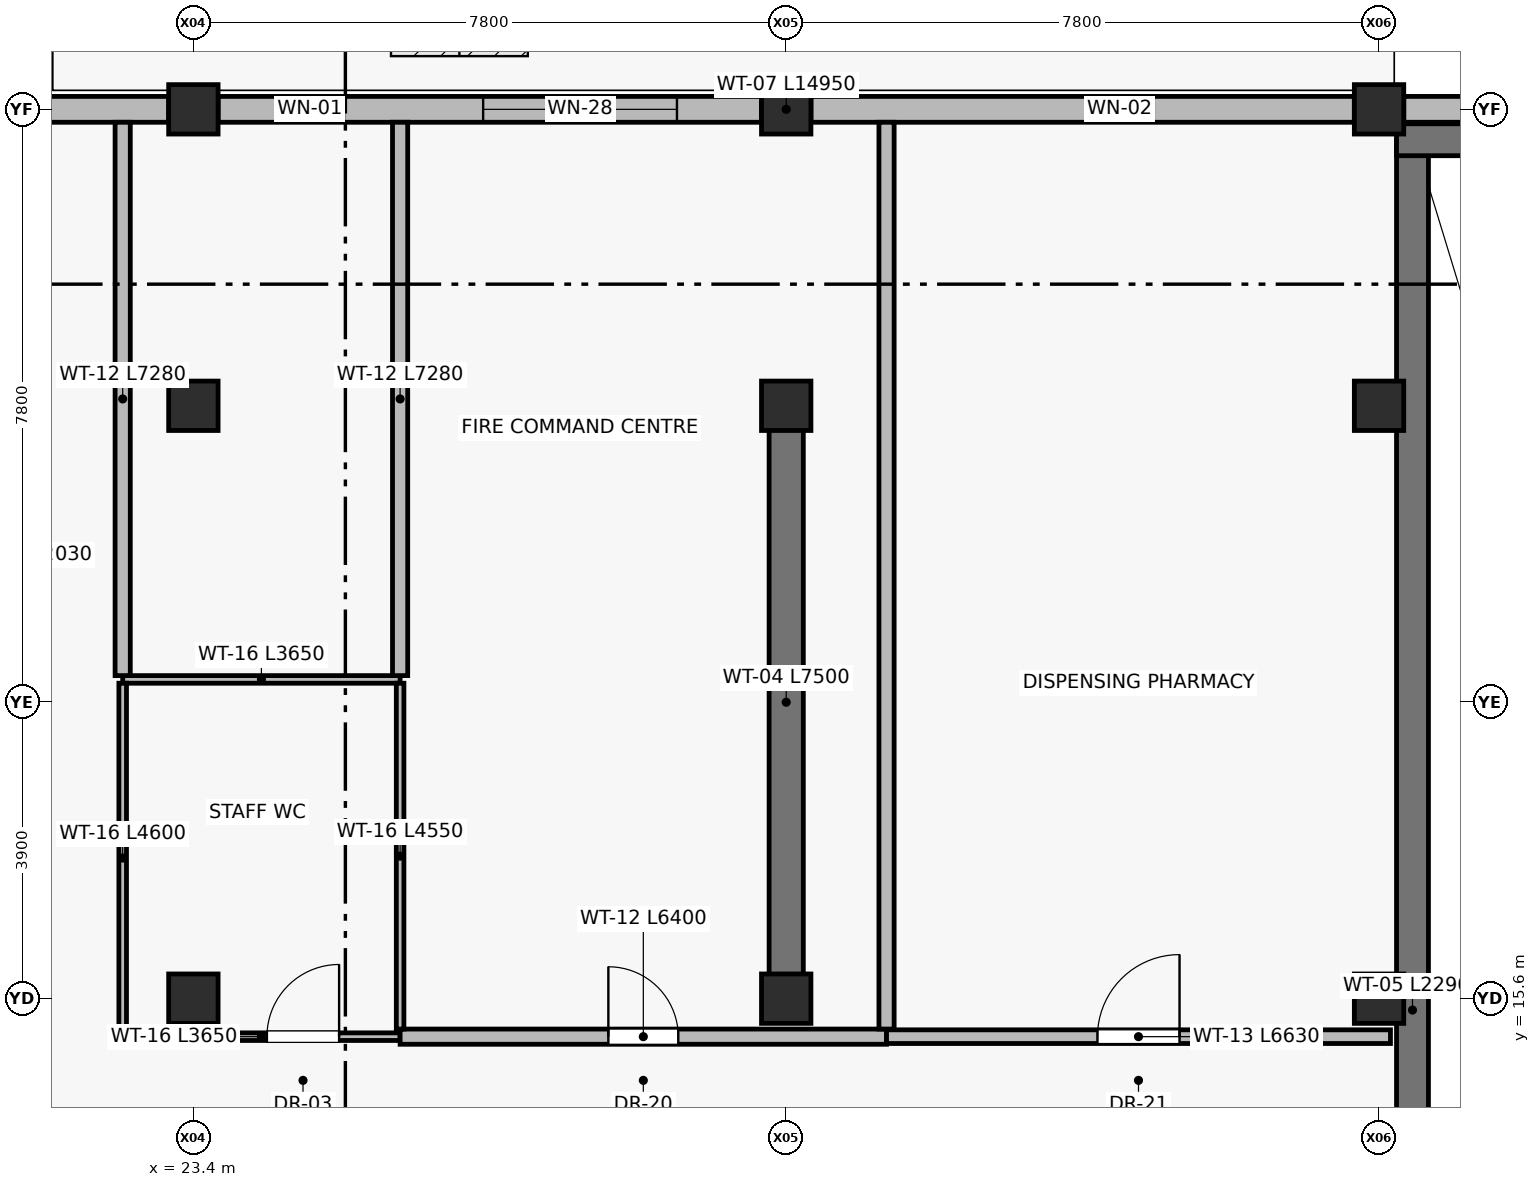
"""IFC4 building model, lengths in metres.
Left out: names, types, materials, properties, quantities, classifications, styles, units other than length and angle.
Written with IfcOpenShell. Run it as: python <this file> out.ifc"""

import sys

from ifc_helpers import new_model, si_unit, direction, frame, frame_2d, origin, origin_2d, place, context, subcontext, project, spatial, rectangle, extrude, element, fill, save


model = new_model("IFC4")
c1 = context("Model", 3, precision=1e-05, world=origin(), true_north=direction((0.0, 1.0)))
c2 = subcontext(c1, "Body", "Model", "MODEL_VIEW")
j1 = project(units=[si_unit("LENGTHUNIT", "METRE"), si_unit("PLANEANGLEUNIT", "RADIAN")], contexts=[c1])
p1 = place(None, origin())
s1 = spatial("IfcSite", under=j1, at=p1, CompositionType="ELEMENT")
p2 = place(p1, origin())
s2 = spatial("IfcBuilding", under=s1, at=p2, CompositionType="ELEMENT")
p3 = place(p2, origin())
s3 = spatial("IfcBuildingStorey", under=s2, at=p3, CompositionType="ELEMENT", Elevation=0.0)
for number, where, z_axis, x_axis in (
    (1, (23.4, 15.6, 0.0), (0.0, 0.0, 1.0), (1.0, 0.0, 0.0)),
    (2, (23.4, 23.4, 0.0), (0.0, 0.0, 1.0), (1.0, 0.0, 0.0)),
    (3, (23.4, 27.3, 0.0), (0.0, 0.0, 1.0), (1.0, 0.0, 0.0)),
    (4, (31.2, 15.6, 0.0), (0.0, 0.0, 1.0), (1.0, 0.0, 0.0)),
    (5, (31.2, 23.4, 0.0), (0.0, 0.0, 1.0), (1.0, 0.0, 0.0)),
    (6, (31.2, 27.3, 0.0), (0.0, 0.0, 1.0), (1.0, 0.0, 0.0)),
    (7, (39.0, 15.6, 0.0), (0.0, 0.0, 1.0), (1.0, 0.0, 0.0)),
    (8, (39.0, 23.4, 0.0), (0.0, 0.0, 1.0), (1.0, 0.0, 0.0)),
    (9, (39.0, 27.3, 0.0), (0.0, 0.0, 1.0), (1.0, 0.0, 0.0)),
):
    element("IfcColumn", number, at=place(p3, frame(where, z_axis=z_axis, x_axis=x_axis)), inside=s3, PredefinedType="COLUMN", context=c2, shape_type="SweptSolid", body=[
        extrude(rectangle(XDim=0.65, YDim=0.65, at=origin_2d()), origin(), (0.0, 0.0, 1.0), 4.8),
    ])
p4 = place(p3, frame((21.3, 27.3, 0.0), z_axis=(0.0, 0.0, 1.0), x_axis=(1.0, 0.0, 0.0)))
e10 = element("IfcWall", 10, at=p4, inside=s3, PredefinedType="STANDARD", context=c2, shape_type="SweptSolid", body=[
    extrude(rectangle(XDim=1.775, YDim=0.34, at=frame_2d((0.887, 0.0))), origin(), (0.0, 0.0, 1.0), 4.14),
])
p5 = place(p3, frame((23.725, 27.3, 0.0), z_axis=(0.0, 0.0, 1.0), x_axis=(1.0, 0.0, 0.0)))
e11 = element("IfcWall", 11, at=p5, inside=s3, PredefinedType="STANDARD", context=c2, shape_type="SweptSolid", body=[
    extrude(rectangle(XDim=7.15, YDim=0.34, at=frame_2d((3.575, 0.0))), origin(), (0.0, 0.0, 1.0), 4.14),
])
p6 = place(p5, frame((0.758, 0.0, 0.9)))
e12 = element("IfcOpeningElement", 12, at=p6, cuts=e11, PredefinedType="OPENING", context=c2, shape_type="SweptSolid", body=[
    extrude(rectangle(XDim=0.9, YDim=1.6, at=frame_2d((0.45, 0.8))), frame((0.0, 0.18, 0.0), z_axis=(0.0, -1.0, 0.0), x_axis=(1.0, 0.0, 0.0)), (0.0, 0.0, 1.0), 0.36),
])
p7 = place(p5, frame((3.488, 0.0, 0.9)))
e13 = element("IfcOpeningElement", 13, at=p7, cuts=e11, PredefinedType="OPENING", context=c2, shape_type="SweptSolid", body=[
    extrude(rectangle(XDim=2.55, YDim=1.8, at=frame_2d((1.275, 0.9))), frame((0.0, 0.18, 0.0), z_axis=(0.0, -1.0, 0.0), x_axis=(1.0, 0.0, 0.0)), (0.0, 0.0, 1.0), 0.36),
])
p8 = place(p3, frame((31.525, 27.3, 0.0), z_axis=(0.0, 0.0, 1.0), x_axis=(1.0, 0.0, 0.0)))
e14 = element("IfcWall", 14, at=p8, inside=s3, PredefinedType="STANDARD", context=c2, shape_type="SweptSolid", body=[
    extrude(rectangle(XDim=7.15, YDim=0.34, at=frame_2d((3.575, 0.0))), origin(), (0.0, 0.0, 1.0), 4.14),
])
p9 = place(p8, frame((3.613, 0.0, 0.9)))
e15 = element("IfcOpeningElement", 15, at=p9, cuts=e14, PredefinedType="OPENING", context=c2, shape_type="SweptSolid", body=[
    extrude(rectangle(XDim=0.9, YDim=2.0, at=frame_2d((0.45, 1.0))), frame((0.0, 0.18, 0.0), z_axis=(0.0, -1.0, 0.0), x_axis=(1.0, 0.0, 0.0)), (0.0, 0.0, 1.0), 0.36),
])
p10 = place(p3, frame((39.325, 27.3, 0.0), z_axis=(0.0, 0.0, 1.0), x_axis=(1.0, 0.0, 0.0)))
e16 = element("IfcWall", 16, at=p10, inside=s3, PredefinedType="STANDARD", context=c2, shape_type="SweptSolid", body=[
    extrude(rectangle(XDim=7.15, YDim=0.34, at=frame_2d((3.575, 0.0))), origin(), (0.0, 0.0, 1.0), 4.14),
])
p11 = place(p3, frame((39.44, 4.0, 0.0), z_axis=(0.0, 0.0, 1.0), x_axis=(0.0, 1.0, 0.0)))
e17 = element("IfcWall", 17, at=p11, inside=s3, PredefinedType="SOLIDWALL", context=c2, shape_type="SweptSolid", body=[
    extrude(rectangle(XDim=22.9, YDim=0.42, at=frame_2d((11.45, 0.0))), origin(), (0.0, 0.0, 1.0), 4.54),
])
p12 = place(p3, frame((39.23, 26.9, 0.0), z_axis=(0.0, 0.0, 1.0), x_axis=(1.0, 0.0, 0.0)))
e18 = element("IfcWall", 18, at=p12, inside=s3, PredefinedType="SOLIDWALL", context=c2, shape_type="SweptSolid", body=[
    extrude(rectangle(XDim=7.34, YDim=0.42, at=frame_2d((3.67, 0.0))), origin(), (0.0, 0.0, 1.0), 4.54),
])
p13 = place(p3, frame((31.2, 15.75, 0.0), z_axis=(0.0, 0.0, 1.0), x_axis=(0.0, 1.0, 0.0)))
e19 = element("IfcWall", 19, at=p13, inside=s3, PredefinedType="SHEAR", context=c2, shape_type="SweptSolid", body=[
    extrude(rectangle(XDim=7.5, YDim=0.45, at=frame_2d((3.75, 0.0))), origin(), (0.0, 0.0, 1.0), 4.54),
])
p14 = place(p3, frame((22.47, 15.1, 0.0), z_axis=(0.0, 0.0, 1.0), x_axis=(1.0, 0.0, 0.0)))
e20 = element("IfcWall", 20, at=p14, inside=s3, PredefinedType="PARTITIONING", context=c2, shape_type="SweptSolid", body=[
    extrude(rectangle(XDim=3.65, YDim=0.1, at=frame_2d((1.825, 0.0))), origin(), (0.0, 0.0, 1.0), 4.54),
])
p15 = place(p14, frame((1.897, 0.0, 0.0)))
e21 = element("IfcOpeningElement", 21, at=p15, cuts=e20, PredefinedType="OPENING", context=c2, shape_type="SweptSolid", body=[
    extrude(rectangle(XDim=0.95, YDim=2.1, at=frame_2d((0.475, 1.05))), frame((0.0, 0.06, 0.0), z_axis=(0.0, -1.0, 0.0), x_axis=(1.0, 0.0, 0.0)), (0.0, 0.0, 1.0), 0.12),
])
p16 = place(p3, frame((22.47, 19.8, 0.0), z_axis=(0.0, 0.0, 1.0), x_axis=(1.0, 0.0, 0.0)))
e22 = element("IfcWall", 22, at=p16, inside=s3, PredefinedType="PARTITIONING", context=c2, shape_type="SweptSolid", body=[
    extrude(rectangle(XDim=3.65, YDim=0.1, at=frame_2d((1.825, 0.0))), origin(), (0.0, 0.0, 1.0), 4.54),
])
p17 = place(p3, frame((26.12, 15.1, 0.0), z_axis=(0.0, 0.0, 1.0), x_axis=(1.0, 0.0, 0.0)))
e23 = element("IfcWall", 23, at=p17, inside=s3, PredefinedType="SOLIDWALL", context=c2, shape_type="SweptSolid", body=[
    extrude(rectangle(XDim=6.4, YDim=0.2, at=frame_2d((3.2, 0.0))), origin(), (0.0, 0.0, 1.0), 4.54),
])
p18 = place(p17, frame((2.74, 0.0, 0.0)))
e24 = element("IfcOpeningElement", 24, at=p18, cuts=e23, PredefinedType="OPENING", context=c2, shape_type="SweptSolid", body=[
    extrude(rectangle(XDim=0.92, YDim=2.15, at=frame_2d((0.46, 1.075))), frame((0.0, 0.11, 0.0), z_axis=(0.0, -1.0, 0.0), x_axis=(1.0, 0.0, 0.0)), (0.0, 0.0, 1.0), 0.22),
])
p19 = place(p3, frame((32.52, 15.1, 0.0), z_axis=(0.0, 0.0, 1.0), x_axis=(1.0, 0.0, 0.0)))
e25 = element("IfcWall", 25, at=p19, inside=s3, PredefinedType="PARTITIONING", context=c2, shape_type="SweptSolid", body=[
    extrude(rectangle(XDim=6.63, YDim=0.18, at=frame_2d((3.315, 0.0))), origin(), (0.0, 0.0, 1.0), 4.54),
])
p20 = place(p19, frame((2.775, 0.0, 0.0)))
e26 = element("IfcOpeningElement", 26, at=p20, cuts=e25, PredefinedType="OPENING", context=c2, shape_type="SweptSolid", body=[
    extrude(rectangle(XDim=1.08, YDim=2.2, at=frame_2d((0.54, 1.1))), frame((0.0, 0.1, 0.0), z_axis=(0.0, -1.0, 0.0), x_axis=(1.0, 0.0, 0.0)), (0.0, 0.0, 1.0), 0.2),
])
p21 = place(p3, frame((22.47, 15.15, 0.0), z_axis=(0.0, 0.0, 1.0), x_axis=(0.0, 1.0, 0.0)))
e27 = element("IfcWall", 27, at=p21, inside=s3, PredefinedType="PARTITIONING", context=c2, shape_type="SweptSolid", body=[
    extrude(rectangle(XDim=4.6, YDim=0.1, at=frame_2d((2.3, 0.0))), origin(), (0.0, 0.0, 1.0), 4.54),
])
p22 = place(p3, frame((26.12, 15.2, 0.0), z_axis=(0.0, 0.0, 1.0), x_axis=(0.0, 1.0, 0.0)))
e28 = element("IfcWall", 28, at=p22, inside=s3, PredefinedType="PARTITIONING", context=c2, shape_type="SweptSolid", body=[
    extrude(rectangle(XDim=4.55, YDim=0.1, at=frame_2d((2.275, 0.0))), origin(), (0.0, 0.0, 1.0), 4.21),
])
p23 = place(p3, frame((26.12, 19.85, 0.0), z_axis=(0.0, 0.0, 1.0), x_axis=(0.0, 1.0, 0.0)))
e29 = element("IfcWall", 29, at=p23, inside=s3, PredefinedType="SOLIDWALL", context=c2, shape_type="SweptSolid", body=[
    extrude(rectangle(XDim=7.28, YDim=0.2, at=frame_2d((3.64, 0.0))), origin(), (0.0, 0.0, 1.0), 4.21),
])
p24 = place(p3, frame((32.52, 15.2, 0.0), z_axis=(0.0, 0.0, 1.0), x_axis=(0.0, 1.0, 0.0)))
e30 = element("IfcWall", 30, at=p24, inside=s3, PredefinedType="SOLIDWALL", context=c2, shape_type="SweptSolid", body=[
    extrude(rectangle(XDim=11.93, YDim=0.2, at=frame_2d((5.965, 0.0))), origin(), (0.0, 0.0, 1.0), 4.54),
])
p25 = place(p3, frame((22.47, 19.85, 0.0), z_axis=(0.0, 0.0, 1.0), x_axis=(0.0, 1.0, 0.0)))
e31 = element("IfcWall", 31, at=p25, inside=s3, PredefinedType="SOLIDWALL", context=c2, shape_type="SweptSolid", body=[
    extrude(rectangle(XDim=7.28, YDim=0.2, at=frame_2d((3.64, 0.0))), origin(), (0.0, 0.0, 1.0), 4.54),
])
p26 = place(p6, origin())
e32 = element("IfcWindow", 32, at=p26, inside=s3, PartitioningType="SINGLE_PANEL", PredefinedType="WINDOW", context=c2, shape_type="SweptSolid", body=[
    extrude(rectangle(XDim=0.9, YDim=1.6, at=frame_2d((0.45, 0.8))), frame((0.0, 0.03, 0.0), z_axis=(0.0, -1.0, 0.0), x_axis=(1.0, 0.0, 0.0)), (0.0, 0.0, 1.0), 0.06),
])
fill(e12, e32)
p27 = place(p7, origin())
e33 = element("IfcWindow", 33, at=p27, inside=s3, PartitioningType="SINGLE_PANEL", PredefinedType="WINDOW", context=c2, shape_type="SweptSolid", body=[
    extrude(rectangle(XDim=2.55, YDim=1.8, at=frame_2d((1.275, 0.9))), frame((0.0, 0.03, 0.0), z_axis=(0.0, -1.0, 0.0), x_axis=(1.0, 0.0, 0.0)), (0.0, 0.0, 1.0), 0.06),
])
fill(e13, e33)
p28 = place(p9, origin())
e34 = element("IfcWindow", 34, at=p28, inside=s3, PartitioningType="SINGLE_PANEL", PredefinedType="WINDOW", context=c2, shape_type="SweptSolid", body=[
    extrude(rectangle(XDim=0.9, YDim=2.0, at=frame_2d((0.45, 1.0))), frame((0.0, 0.03, 0.0), z_axis=(0.0, -1.0, 0.0), x_axis=(1.0, 0.0, 0.0)), (0.0, 0.0, 1.0), 0.06),
])
fill(e15, e34)
p29 = place(p15, origin())
e35 = element("IfcDoor", 35, at=p29, inside=s3, OperationType="SINGLE_SWING_RIGHT", PredefinedType="DOOR", context=c2, shape_type="SweptSolid", body=[
    extrude(rectangle(XDim=0.95, YDim=2.1, at=frame_2d((0.475, 1.05))), frame((0.0, 0.025, 0.0), z_axis=(0.0, -1.0, 0.0), x_axis=(1.0, 0.0, 0.0)), (0.0, 0.0, 1.0), 0.05),
])
fill(e21, e35)
p30 = place(p18, origin())
e36 = element("IfcDoor", 36, at=p30, inside=s3, OperationType="SINGLE_SWING_LEFT", PredefinedType="DOOR", context=c2, shape_type="SweptSolid", body=[
    extrude(rectangle(XDim=0.92, YDim=2.15, at=frame_2d((0.46, 1.075))), frame((0.0, 0.025, 0.0), z_axis=(0.0, -1.0, 0.0), x_axis=(1.0, 0.0, 0.0)), (0.0, 0.0, 1.0), 0.05),
])
fill(e24, e36)
p31 = place(p20, origin())
e37 = element("IfcDoor", 37, at=p31, inside=s3, OperationType="SINGLE_SWING_RIGHT", PredefinedType="DOOR", context=c2, shape_type="SweptSolid", body=[
    extrude(rectangle(XDim=1.08, YDim=2.2, at=frame_2d((0.54, 1.1))), frame((0.0, 0.025, 0.0), z_axis=(0.0, -1.0, 0.0), x_axis=(1.0, 0.0, 0.0)), (0.0, 0.0, 1.0), 0.05),
])
fill(e26, e37)
save(model, sys.argv[1])
